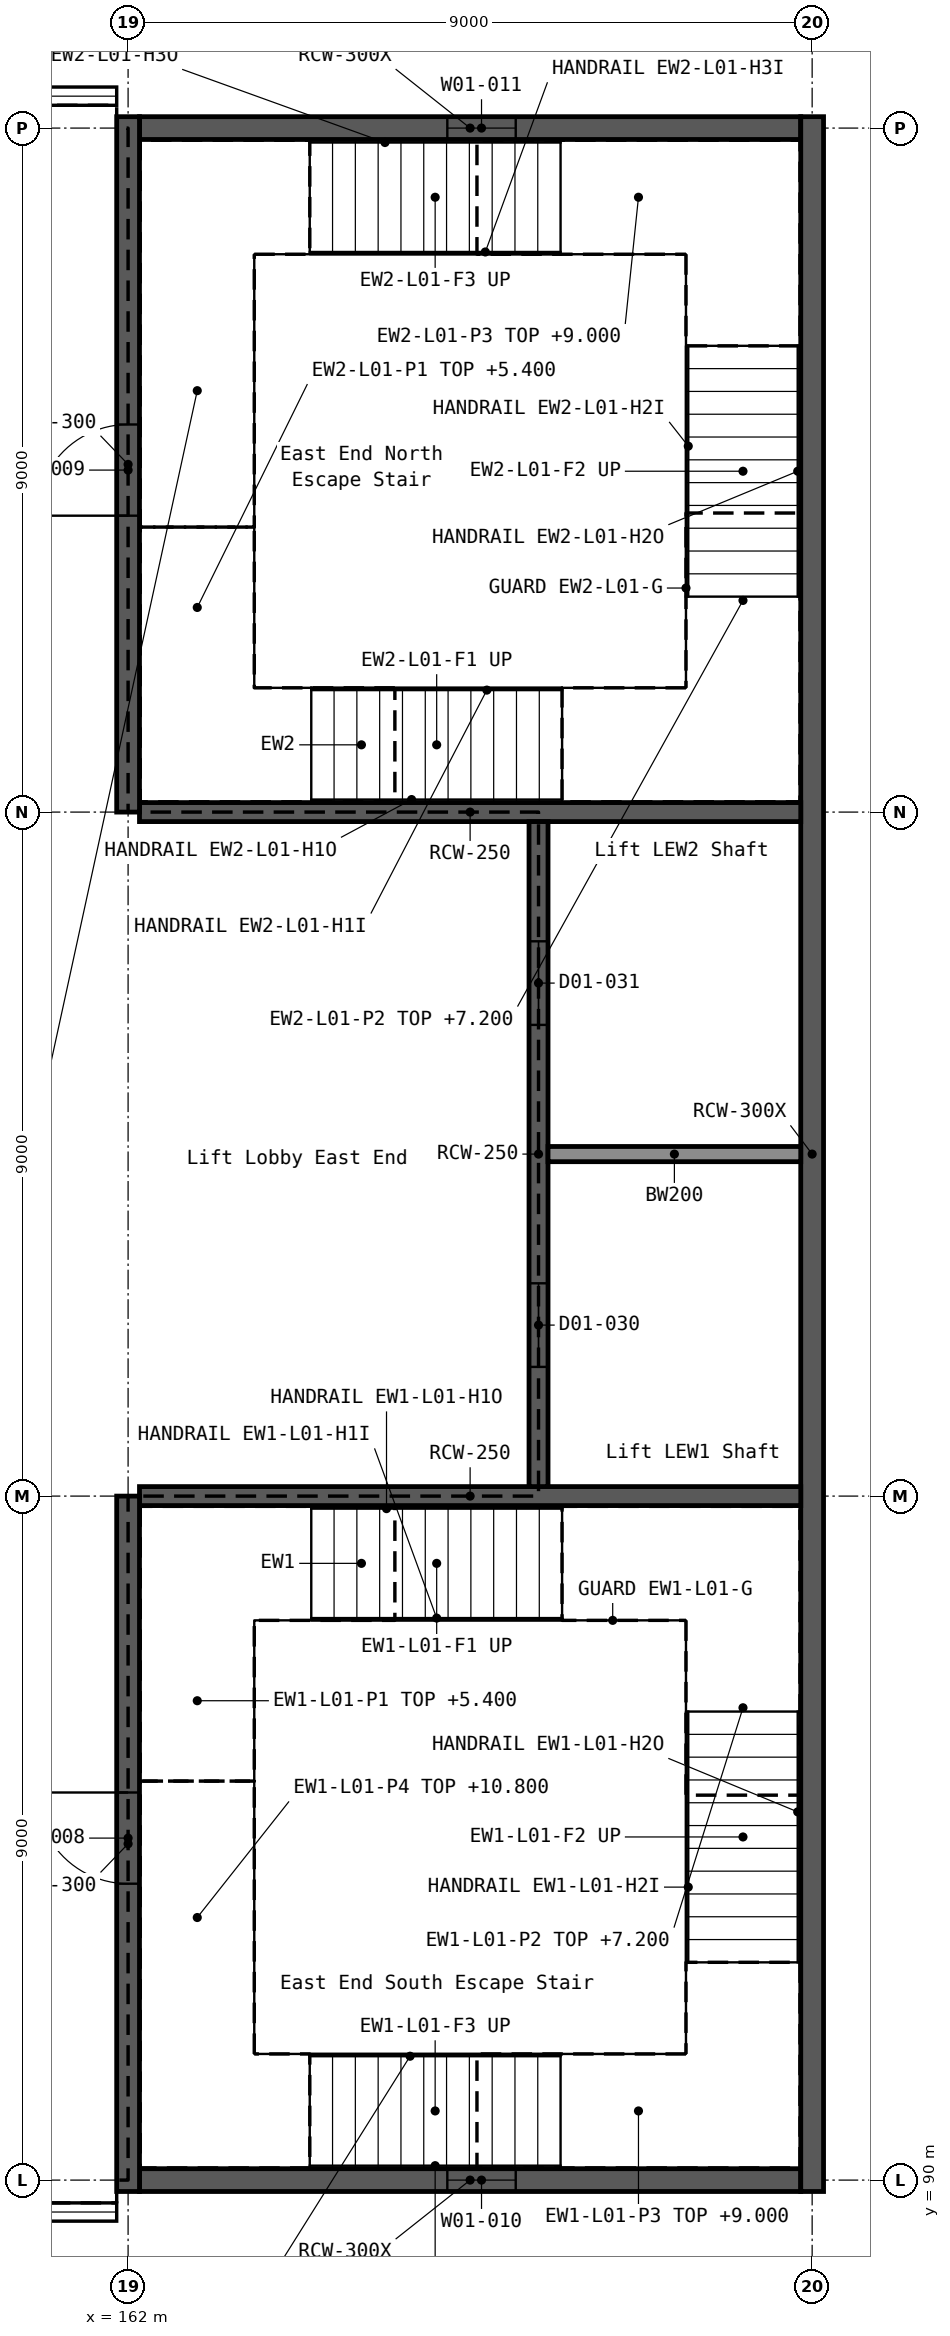
"""IFC4 building model, lengths in metres.
Left out: names, types, materials, properties, quantities, classifications, styles, units other than length and angle.
Written with IfcOpenShell. Run it as: python <this file> out.ifc"""

import sys

from ifc_helpers import new_model, si_unit, direction, frame, frame_2d, origin, place, context, subcontext, project, spatial, rectangle, extrude, element, fill, save


model = new_model("IFC4")
c1 = context("Model", 3, precision=1e-05, world=origin(), true_north=direction((0.0, 1.0)))
c2 = subcontext(c1, "Body", "Model", "MODEL_VIEW")
j1 = project(units=[si_unit("LENGTHUNIT", "METRE"), si_unit("PLANEANGLEUNIT", "RADIAN")], contexts=[c1])
p1 = place(None, origin())
s1 = spatial("IfcSite", under=j1, at=p1, CompositionType="ELEMENT")
p2 = place(p1, origin())
s2 = spatial("IfcBuilding", under=s1, at=p2, CompositionType="ELEMENT")
p3 = place(p2, frame((0.0, 0.0, 5.4)))
s3 = spatial("IfcBuildingStorey", under=s2, at=p3, CompositionType="ELEMENT", Elevation=5.4)
p4 = place(p3, frame((162.15, 90.0, 0.0), z_axis=(0.0, 0.0, 1.0), x_axis=(1.0, 0.0, 0.0)))
e1 = element("IfcWall", 1, at=p4, inside=s3, PredefinedType="SHEAR", context=c2, shape_type="SweptSolid", body=[
    extrude(rectangle(XDim=8.7, YDim=0.3, at=frame_2d((4.35, 0.0))), origin(), (0.0, 0.0, 1.0), 5.4),
])
p5 = place(p4, frame((4.05, 0.0, 1.5)))
e2 = element("IfcOpeningElement", 2, at=p5, cuts=e1, PredefinedType="OPENING", context=c2, shape_type="SweptSolid", body=[
    extrude(rectangle(XDim=0.9, YDim=1.2, at=frame_2d((0.45, 0.6))), frame((0.0, 0.161, 0.0), z_axis=(0.0, -1.0, 0.0), x_axis=(1.0, 0.0, 0.0)), (0.0, 0.0, 1.0), 0.322),
])
p6 = place(p3, frame((162.15, 117.0, 0.0), z_axis=(0.0, 0.0, 1.0), x_axis=(1.0, 0.0, 0.0)))
e3 = element("IfcWall", 3, at=p6, inside=s3, PredefinedType="SHEAR", context=c2, shape_type="SweptSolid", body=[
    extrude(rectangle(XDim=8.7, YDim=0.3, at=frame_2d((4.35, 0.0))), origin(), (0.0, 0.0, 1.0), 5.4),
])
p7 = place(p6, frame((4.05, 0.0, 1.5)))
e4 = element("IfcOpeningElement", 4, at=p7, cuts=e3, PredefinedType="OPENING", context=c2, shape_type="SweptSolid", body=[
    extrude(rectangle(XDim=0.9, YDim=1.2, at=frame_2d((0.45, 0.6))), frame((0.0, 0.161, 0.0), z_axis=(0.0, -1.0, 0.0), x_axis=(1.0, 0.0, 0.0)), (0.0, 0.0, 1.0), 0.322),
])
p8 = place(p3, frame((171.0, 89.85, 0.0), z_axis=(0.0, 0.0, 1.0), x_axis=(0.0, 1.0, 0.0)))
e5 = element("IfcWall", 5, at=p8, inside=s3, PredefinedType="SHEAR", context=c2, shape_type="SweptSolid", body=[
    extrude(rectangle(XDim=27.3, YDim=0.3, at=frame_2d((13.65, 0.0))), origin(), (0.0, 0.0, 1.0), 5.4),
])
for number, where, z_axis, x_axis in (
    (6, (162.15, 99.0, 0.0), (0.0, 0.0, 1.0), (1.0, 0.0, 0.0)),
    (7, (162.15, 108.0, 0.0), (0.0, 0.0, 1.0), (1.0, 0.0, 0.0)),
):
    element("IfcWall", number, at=place(p3, frame(where, z_axis=z_axis, x_axis=x_axis)), inside=s3, PredefinedType="SHEAR", context=c2, shape_type="SweptSolid", body=[
        extrude(rectangle(XDim=8.7, YDim=0.25, at=frame_2d((4.35, 0.0))), origin(), (0.0, 0.0, 1.0), 5.4),
    ])
p9 = place(p3, frame((167.4, 99.125, 0.0), z_axis=(0.0, 0.0, 1.0), x_axis=(0.0, 1.0, 0.0)))
e8 = element("IfcWall", 8, at=p9, inside=s3, PredefinedType="SHEAR", context=c2, shape_type="SweptSolid", body=[
    extrude(rectangle(XDim=8.75, YDim=0.25, at=frame_2d((4.375, 0.0))), origin(), (0.0, 0.0, 1.0), 5.4),
])
p10 = place(p9, frame((1.575, 0.0, 0.0)))
e9 = element("IfcOpeningElement", 9, at=p10, cuts=e8, PredefinedType="OPENING", context=c2, shape_type="SweptSolid", body=[
    extrude(rectangle(XDim=1.1, YDim=2.1, at=frame_2d((0.55, 1.05))), frame((0.0, 0.136, 0.0), z_axis=(0.0, -1.0, 0.0), x_axis=(1.0, 0.0, 0.0)), (0.0, 0.0, 1.0), 0.272),
])
p11 = place(p9, frame((6.075, 0.0, 0.0)))
e10 = element("IfcOpeningElement", 10, at=p11, cuts=e8, PredefinedType="OPENING", context=c2, shape_type="SweptSolid", body=[
    extrude(rectangle(XDim=1.1, YDim=2.1, at=frame_2d((0.55, 1.05))), frame((0.0, 0.136, 0.0), z_axis=(0.0, -1.0, 0.0), x_axis=(1.0, 0.0, 0.0)), (0.0, 0.0, 1.0), 0.272),
])
p12 = place(p3, frame((162.0, 89.85, 0.0), z_axis=(0.0, 0.0, 1.0), x_axis=(0.0, 1.0, 0.0)))
e11 = element("IfcWall", 11, at=p12, inside=s3, PredefinedType="SHEAR", context=c2, shape_type="SweptSolid", body=[
    extrude(rectangle(XDim=9.15, YDim=0.3, at=frame_2d((4.575, 0.0))), origin(), (0.0, 0.0, 1.0), 5.4),
])
p13 = place(p12, frame((4.05, 0.0, 0.0)))
e12 = element("IfcOpeningElement", 12, at=p13, cuts=e11, PredefinedType="OPENING", context=c2, shape_type="SweptSolid", body=[
    extrude(rectangle(XDim=1.2, YDim=2.1, at=frame_2d((0.6, 1.05))), frame((0.0, 0.161, 0.0), z_axis=(0.0, -1.0, 0.0), x_axis=(1.0, 0.0, 0.0)), (0.0, 0.0, 1.0), 0.322),
])
p14 = place(p3, frame((162.0, 108.0, 0.0), z_axis=(0.0, 0.0, 1.0), x_axis=(0.0, 1.0, 0.0)))
e13 = element("IfcWall", 13, at=p14, inside=s3, PredefinedType="SHEAR", context=c2, shape_type="SweptSolid", body=[
    extrude(rectangle(XDim=9.15, YDim=0.3, at=frame_2d((4.575, 0.0))), origin(), (0.0, 0.0, 1.0), 5.4),
])
p15 = place(p14, frame((3.9, 0.0, 0.0)))
e14 = element("IfcOpeningElement", 14, at=p15, cuts=e13, PredefinedType="OPENING", context=c2, shape_type="SweptSolid", body=[
    extrude(rectangle(XDim=1.2, YDim=2.1, at=frame_2d((0.6, 1.05))), frame((0.0, 0.161, 0.0), z_axis=(0.0, -1.0, 0.0), x_axis=(1.0, 0.0, 0.0)), (0.0, 0.0, 1.0), 0.322),
])
p16 = place(p3, frame((167.525, 103.5, 0.0), z_axis=(0.0, 0.0, 1.0), x_axis=(1.0, 0.0, 0.0)))
e15 = element("IfcWall", 15, at=p16, inside=s3, PredefinedType="SOLIDWALL", context=c2, shape_type="SweptSolid", body=[
    extrude(rectangle(XDim=3.325, YDim=0.2, at=frame_2d((1.663, 0.0))), origin(), (0.0, 0.0, 1.0), 5.4),
])
p17 = place(p5, origin())
e16 = element("IfcWindow", 16, at=p17, inside=s3, PartitioningType="SINGLE_PANEL", PredefinedType="WINDOW", context=c2, shape_type="SweptSolid", body=[
    extrude(rectangle(XDim=0.9, YDim=1.2, at=frame_2d((0.45, 0.6))), frame((0.0, 0.03, 0.0), z_axis=(0.0, -1.0, 0.0), x_axis=(1.0, 0.0, 0.0)), (0.0, 0.0, 1.0), 0.06),
])
fill(e2, e16)
p18 = place(p7, origin())
e17 = element("IfcWindow", 17, at=p18, inside=s3, PartitioningType="SINGLE_PANEL", PredefinedType="WINDOW", context=c2, shape_type="SweptSolid", body=[
    extrude(rectangle(XDim=0.9, YDim=1.2, at=frame_2d((0.45, 0.6))), frame((0.0, 0.03, 0.0), z_axis=(0.0, -1.0, 0.0), x_axis=(1.0, 0.0, 0.0)), (0.0, 0.0, 1.0), 0.06),
])
fill(e4, e17)
p19 = place(p13, origin())
e18 = element("IfcDoor", 18, at=p19, inside=s3, OperationType="SINGLE_SWING_RIGHT", PredefinedType="DOOR", context=c2, shape_type="SweptSolid", body=[
    extrude(rectangle(XDim=1.2, YDim=2.1, at=frame_2d((0.6, 1.05))), frame((0.0, 0.025, 0.0), z_axis=(0.0, -1.0, 0.0), x_axis=(1.0, 0.0, 0.0)), (0.0, 0.0, 1.0), 0.05),
])
fill(e12, e18)
p20 = place(p15, origin())
e19 = element("IfcDoor", 19, at=p20, inside=s3, OperationType="SINGLE_SWING_LEFT", PredefinedType="DOOR", context=c2, shape_type="SweptSolid", body=[
    extrude(rectangle(XDim=1.2, YDim=2.1, at=frame_2d((0.6, 1.05))), frame((0.0, 0.025, 0.0), z_axis=(0.0, -1.0, 0.0), x_axis=(1.0, 0.0, 0.0)), (0.0, 0.0, 1.0), 0.05),
])
fill(e14, e19)
p21 = place(p10, origin())
e20 = element("IfcDoor", 20, at=p21, inside=s3, OperationType="DOUBLE_DOOR_SLIDING", PredefinedType="DOOR", context=c2, shape_type="SweptSolid", body=[
    extrude(rectangle(XDim=1.1, YDim=2.1, at=frame_2d((0.55, 1.05))), frame((0.0, 0.025, 0.0), z_axis=(0.0, -1.0, 0.0), x_axis=(1.0, 0.0, 0.0)), (0.0, 0.0, 1.0), 0.05),
])
fill(e9, e20)
p22 = place(p11, origin())
e21 = element("IfcDoor", 21, at=p22, inside=s3, OperationType="DOUBLE_DOOR_SLIDING", PredefinedType="DOOR", context=c2, shape_type="SweptSolid", body=[
    extrude(rectangle(XDim=1.1, YDim=2.1, at=frame_2d((0.55, 1.05))), frame((0.0, 0.025, 0.0), z_axis=(0.0, -1.0, 0.0), x_axis=(1.0, 0.0, 0.0)), (0.0, 0.0, 1.0), 0.05),
])
fill(e10, e21)
save(model, sys.argv[1])
